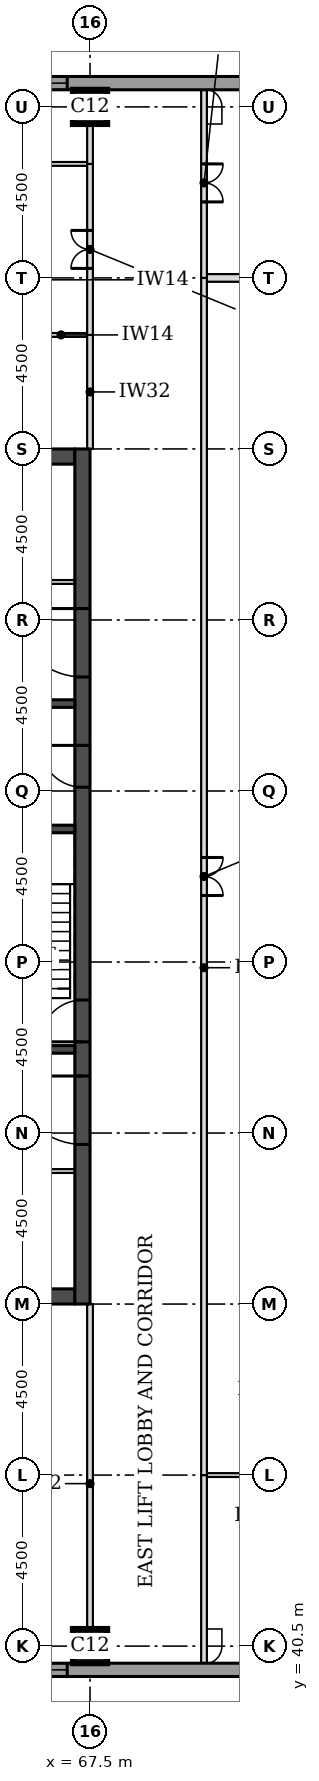
"""IFC4 building model, lengths in metres.
Left out: names, types, materials, properties, quantities, classifications, styles, units other than length and angle.
Written with IfcOpenShell. Run it as: python <this file> out.ifc"""

import sys

from ifc_helpers import new_model, si_unit, direction, frame, frame_2d, origin, origin_2d, place, context, subcontext, project, spatial, rectangle, extrude, element, fill, save


model = new_model("IFC4")
c1 = context("Model", 3, precision=1e-05, world=origin(), true_north=direction((0.0, 1.0)))
c2 = subcontext(c1, "Body", "Model", "MODEL_VIEW")
j1 = project(units=[si_unit("LENGTHUNIT", "METRE"), si_unit("PLANEANGLEUNIT", "RADIAN")], contexts=[c1])
p1 = place(None, origin())
s1 = spatial("IfcSite", under=j1, at=p1, CompositionType="ELEMENT")
p2 = place(p1, origin())
s2 = spatial("IfcBuilding", under=s1, at=p2, CompositionType="ELEMENT")
p3 = place(p2, frame((0.0, 0.0, 173.6)))
s3 = spatial("IfcBuildingStorey", under=s2, at=p3, CompositionType="ELEMENT", Elevation=173.6)
for number, where, z_axis, x_axis in (
    (1, (67.5, 40.5, 0.0), (0.0, 0.0, 1.0), (1.0, 0.0, 0.0)),
    (2, (67.5, 81.0, 0.0), (0.0, 0.0, 1.0), (1.0, 0.0, 0.0)),
):
    element("IfcColumn", number, at=place(p3, frame(where, z_axis=z_axis, x_axis=x_axis)), inside=s3, PredefinedType="COLUMN", context=c2, shape_type="SweptSolid", body=[
        extrude(rectangle(XDim=0.9, YDim=0.9, at=origin_2d()), origin(), (0.0, 0.0, 1.0), 3.7),
    ])
for number, where, z_axis, x_axis in (
    (3, (45.4, 49.7, 0.0), (0.0, 0.0, 1.0), (1.0, 0.0, 0.0)),
    (4, (45.4, 71.8, 0.0), (0.0, 0.0, 1.0), (1.0, 0.0, 0.0)),
):
    element("IfcWall", number, at=place(p3, frame(where, z_axis=z_axis, x_axis=x_axis)), inside=s3, PredefinedType="SHEAR", context=c2, shape_type="SweptSolid", body=[
        extrude(rectangle(XDim=21.7, YDim=0.4, at=frame_2d((10.85, 0.0))), origin(), (0.0, 0.0, 1.0), 3.7),
    ])
p4 = place(p3, frame((67.3, 49.5, 0.0), z_axis=(0.0, 0.0, 1.0), x_axis=(0.0, 1.0, 0.0)))
e5 = element("IfcWall", 5, at=p4, inside=s3, PredefinedType="SHEAR", context=c2, shape_type="SweptSolid", body=[
    extrude(rectangle(XDim=22.5, YDim=0.4, at=frame_2d((11.25, 0.0))), origin(), (0.0, 0.0, 1.0), 3.7),
])
p5 = place(p4, frame((4.2, 0.0, 0.0)))
e6 = element("IfcOpeningElement", 6, at=p5, cuts=e5, PredefinedType="OPENING", context=c2, shape_type="SweptSolid", body=[
    extrude(rectangle(XDim=1.8, YDim=2.1, at=frame_2d((0.9, 1.05))), frame((0.0, 0.21, 0.0), z_axis=(0.0, -1.0, 0.0), x_axis=(1.0, 0.0, 0.0)), (0.0, 0.0, 1.0), 0.42),
])
p6 = place(p4, frame((6.9, 0.0, 0.0)))
e7 = element("IfcOpeningElement", 7, at=p6, cuts=e5, PredefinedType="OPENING", context=c2, shape_type="SweptSolid", body=[
    extrude(rectangle(XDim=1.1, YDim=2.1, at=frame_2d((0.55, 1.05))), frame((0.0, 0.21, 0.0), z_axis=(0.0, -1.0, 0.0), x_axis=(1.0, 0.0, 0.0)), (0.0, 0.0, 1.0), 0.42),
])
p7 = place(p4, frame((13.6, 0.0, 0.0)))
e8 = element("IfcOpeningElement", 8, at=p7, cuts=e5, PredefinedType="OPENING", context=c2, shape_type="SweptSolid", body=[
    extrude(rectangle(XDim=1.1, YDim=2.1, at=frame_2d((0.55, 1.05))), frame((0.0, 0.21, 0.0), z_axis=(0.0, -1.0, 0.0), x_axis=(1.0, 0.0, 0.0)), (0.0, 0.0, 1.0), 0.42),
])
p8 = place(p4, frame((16.5, 0.0, 0.0)))
e9 = element("IfcOpeningElement", 9, at=p8, cuts=e5, PredefinedType="OPENING", context=c2, shape_type="SweptSolid", body=[
    extrude(rectangle(XDim=1.8, YDim=2.1, at=frame_2d((0.9, 1.05))), frame((0.0, 0.21, 0.0), z_axis=(0.0, -1.0, 0.0), x_axis=(1.0, 0.0, 0.0)), (0.0, 0.0, 1.0), 0.42),
])
p9 = place(p3, frame((36.0, 39.875, 0.0), z_axis=(0.0, 0.0, 1.0), x_axis=(1.0, 0.0, 0.0)))
e10 = element("IfcWall", 10, at=p9, inside=s3, PredefinedType="STANDARD", context=c2, shape_type="SweptSolid", body=[
    extrude(rectangle(XDim=36.331, YDim=0.35, at=frame_2d((18.166, 0.0))), origin(), (0.0, 0.0, 1.0), 3.525),
])
p10 = place(p9, frame((5.1, 0.0, 0.9)))
e11 = element("IfcOpeningElement", 11, at=p10, cuts=e10, PredefinedType="OPENING", context=c2, shape_type="SweptSolid", body=[
    extrude(rectangle(XDim=3.3, YDim=1.9, at=frame_2d((1.65, 0.95))), frame((0.0, 0.185, 0.0), z_axis=(0.0, -1.0, 0.0), x_axis=(1.0, 0.0, 0.0)), (0.0, 0.0, 1.0), 0.37),
])
p11 = place(p9, frame((9.6, 0.0, 0.9)))
e12 = element("IfcOpeningElement", 12, at=p11, cuts=e10, PredefinedType="OPENING", context=c2, shape_type="SweptSolid", body=[
    extrude(rectangle(XDim=3.3, YDim=1.9, at=frame_2d((1.65, 0.95))), frame((0.0, 0.185, 0.0), z_axis=(0.0, -1.0, 0.0), x_axis=(1.0, 0.0, 0.0)), (0.0, 0.0, 1.0), 0.37),
])
p12 = place(p9, frame((14.1, 0.0, 0.9)))
e13 = element("IfcOpeningElement", 13, at=p12, cuts=e10, PredefinedType="OPENING", context=c2, shape_type="SweptSolid", body=[
    extrude(rectangle(XDim=3.3, YDim=1.9, at=frame_2d((1.65, 0.95))), frame((0.0, 0.185, 0.0), z_axis=(0.0, -1.0, 0.0), x_axis=(1.0, 0.0, 0.0)), (0.0, 0.0, 1.0), 0.37),
])
p13 = place(p9, frame((18.6, 0.0, 0.9)))
e14 = element("IfcOpeningElement", 14, at=p13, cuts=e10, PredefinedType="OPENING", context=c2, shape_type="SweptSolid", body=[
    extrude(rectangle(XDim=3.3, YDim=1.9, at=frame_2d((1.65, 0.95))), frame((0.0, 0.185, 0.0), z_axis=(0.0, -1.0, 0.0), x_axis=(1.0, 0.0, 0.0)), (0.0, 0.0, 1.0), 0.37),
])
p14 = place(p9, frame((23.1, 0.0, 0.9)))
e15 = element("IfcOpeningElement", 15, at=p14, cuts=e10, PredefinedType="OPENING", context=c2, shape_type="SweptSolid", body=[
    extrude(rectangle(XDim=3.3, YDim=1.9, at=frame_2d((1.65, 0.95))), frame((0.0, 0.185, 0.0), z_axis=(0.0, -1.0, 0.0), x_axis=(1.0, 0.0, 0.0)), (0.0, 0.0, 1.0), 0.37),
])
p15 = place(p9, frame((27.6, 0.0, 0.9)))
e16 = element("IfcOpeningElement", 16, at=p15, cuts=e10, PredefinedType="OPENING", context=c2, shape_type="SweptSolid", body=[
    extrude(rectangle(XDim=3.3, YDim=1.9, at=frame_2d((1.65, 0.95))), frame((0.0, 0.185, 0.0), z_axis=(0.0, -1.0, 0.0), x_axis=(1.0, 0.0, 0.0)), (0.0, 0.0, 1.0), 0.37),
])
p16 = place(p3, frame((72.331, 81.625, 0.0), z_axis=(0.0, 0.0, 1.0), x_axis=(-1.0, 0.0, 0.0)))
e17 = element("IfcWall", 17, at=p16, inside=s3, PredefinedType="STANDARD", context=c2, shape_type="SweptSolid", body=[
    extrude(rectangle(XDim=32.163, YDim=0.35, at=frame_2d((16.081, 0.0))), origin(), (0.0, 0.0, 1.0), 3.525),
])
p17 = place(p16, frame((5.431, 0.0, 0.9)))
e18 = element("IfcOpeningElement", 18, at=p17, cuts=e17, PredefinedType="OPENING", context=c2, shape_type="SweptSolid", body=[
    extrude(rectangle(XDim=3.3, YDim=1.9, at=frame_2d((1.65, 0.95))), frame((0.0, 0.185, 0.0), z_axis=(0.0, -1.0, 0.0), x_axis=(1.0, 0.0, 0.0)), (0.0, 0.0, 1.0), 0.37),
])
p18 = place(p16, frame((9.931, 0.0, 0.9)))
e19 = element("IfcOpeningElement", 19, at=p18, cuts=e17, PredefinedType="OPENING", context=c2, shape_type="SweptSolid", body=[
    extrude(rectangle(XDim=3.3, YDim=1.9, at=frame_2d((1.65, 0.95))), frame((0.0, 0.185, 0.0), z_axis=(0.0, -1.0, 0.0), x_axis=(1.0, 0.0, 0.0)), (0.0, 0.0, 1.0), 0.37),
])
p19 = place(p16, frame((14.431, 0.0, 0.9)))
e20 = element("IfcOpeningElement", 20, at=p19, cuts=e17, PredefinedType="OPENING", context=c2, shape_type="SweptSolid", body=[
    extrude(rectangle(XDim=3.3, YDim=1.9, at=frame_2d((1.65, 0.95))), frame((0.0, 0.185, 0.0), z_axis=(0.0, -1.0, 0.0), x_axis=(1.0, 0.0, 0.0)), (0.0, 0.0, 1.0), 0.37),
])
p20 = place(p16, frame((18.931, 0.0, 0.9)))
e21 = element("IfcOpeningElement", 21, at=p20, cuts=e17, PredefinedType="OPENING", context=c2, shape_type="SweptSolid", body=[
    extrude(rectangle(XDim=3.3, YDim=1.9, at=frame_2d((1.65, 0.95))), frame((0.0, 0.185, 0.0), z_axis=(0.0, -1.0, 0.0), x_axis=(1.0, 0.0, 0.0)), (0.0, 0.0, 1.0), 0.37),
])
p21 = place(p16, frame((23.431, 0.0, 0.9)))
e22 = element("IfcOpeningElement", 22, at=p21, cuts=e17, PredefinedType="OPENING", context=c2, shape_type="SweptSolid", body=[
    extrude(rectangle(XDim=3.3, YDim=1.9, at=frame_2d((1.65, 0.95))), frame((0.0, 0.185, 0.0), z_axis=(0.0, -1.0, 0.0), x_axis=(1.0, 0.0, 0.0)), (0.0, 0.0, 1.0), 0.37),
])
p22 = place(p3, frame((70.575, 45.0, 0.0), z_axis=(0.0, 0.0, 1.0), x_axis=(1.0, 0.0, 0.0)))
e23 = element("IfcWall", 23, at=p22, inside=s3, PredefinedType="PARTITIONING", context=c2, shape_type="SweptSolid", body=[
    extrude(rectangle(XDim=2.925, YDim=0.1, at=frame_2d((1.462, 0.0))), origin(), (0.0, 0.0, 1.0), 3.096),
])
p23 = place(p22, frame((1.0, 0.0, 0.0)))
e24 = element("IfcOpeningElement", 24, at=p23, cuts=e23, PredefinedType="OPENING", context=c2, shape_type="SweptSolid", body=[
    extrude(rectangle(XDim=0.9, YDim=2.1, at=frame_2d((0.45, 1.05))), frame((0.0, 0.06, 0.0), z_axis=(0.0, -1.0, 0.0), x_axis=(1.0, 0.0, 0.0)), (0.0, 0.0, 1.0), 0.12),
])
p24 = place(p3, frame((64.45, 75.0, 0.0), z_axis=(0.0, 0.0, 1.0), x_axis=(1.0, 0.0, 0.0)))
e25 = element("IfcWall", 25, at=p24, inside=s3, PredefinedType="PARTITIONING", context=c2, shape_type="SweptSolid", body=[
    extrude(rectangle(XDim=2.975, YDim=0.1, at=frame_2d((1.488, 0.0))), origin(), (0.0, 0.0, 1.0), 3.55),
])
p25 = place(p3, frame((70.575, 76.5, 0.0), z_axis=(0.0, 0.0, 1.0), x_axis=(1.0, 0.0, 0.0)))
e26 = element("IfcWall", 26, at=p25, inside=s3, PredefinedType="PARTITIONING", context=c2, shape_type="SweptSolid", body=[
    extrude(rectangle(XDim=5.475, YDim=0.2, at=frame_2d((2.738, 0.0))), origin(), (0.0, 0.0, 1.0), 3.096),
])
p26 = place(p3, frame((64.45, 79.5, 0.0), z_axis=(0.0, 0.0, 1.0), x_axis=(1.0, 0.0, 0.0)))
e27 = element("IfcWall", 27, at=p26, inside=s3, PredefinedType="PARTITIONING", context=c2, shape_type="SweptSolid", body=[
    extrude(rectangle(XDim=2.975, YDim=0.1, at=frame_2d((1.488, 0.0))), origin(), (0.0, 0.0, 1.0), 3.55),
])
p27 = place(p3, frame((67.5, 40.05, 0.0), z_axis=(0.0, 0.0, 1.0), x_axis=(0.0, 1.0, 0.0)))
e28 = element("IfcWall", 28, at=p27, inside=s3, PredefinedType="PARTITIONING", context=c2, shape_type="SweptSolid", body=[
    extrude(rectangle(XDim=9.45, YDim=0.15, at=frame_2d((4.725, 0.0))), origin(), (0.0, 0.0, 1.0), 3.022),
])
p28 = place(p3, frame((70.5, 40.05, 0.0), z_axis=(0.0, 0.0, 1.0), x_axis=(0.0, 1.0, 0.0)))
e29 = element("IfcWall", 29, at=p28, inside=s3, PredefinedType="PARTITIONING", context=c2, shape_type="SweptSolid", body=[
    extrude(rectangle(XDim=4.95, YDim=0.15, at=frame_2d((2.475, 0.0))), origin(), (0.0, 0.0, 1.0), 3.55),
])
p29 = place(p3, frame((70.5, 45.0, 0.0), z_axis=(0.0, 0.0, 1.0), x_axis=(0.0, 1.0, 0.0)))
e30 = element("IfcWall", 30, at=p29, inside=s3, PredefinedType="PARTITIONING", context=c2, shape_type="SweptSolid", body=[
    extrude(rectangle(XDim=31.5, YDim=0.15, at=frame_2d((15.75, 0.0))), origin(), (0.0, 0.0, 1.0), 3.55),
])
p30 = place(p29, frame((15.25, 0.0, 0.0)))
e31 = element("IfcOpeningElement", 31, at=p30, cuts=e30, PredefinedType="OPENING", context=c2, shape_type="SweptSolid", body=[
    extrude(rectangle(XDim=1.0, YDim=2.1, at=frame_2d((0.5, 1.05))), frame((0.0, 0.085, 0.0), z_axis=(0.0, -1.0, 0.0), x_axis=(1.0, 0.0, 0.0)), (0.0, 0.0, 1.0), 0.17),
])
p31 = place(p3, frame((67.5, 72.0, 0.0), z_axis=(0.0, 0.0, 1.0), x_axis=(0.0, 1.0, 0.0)))
e32 = element("IfcWall", 32, at=p31, inside=s3, PredefinedType="PARTITIONING", context=c2, shape_type="SweptSolid", body=[
    extrude(rectangle(XDim=3.0, YDim=0.15, at=frame_2d((1.5, 0.0))), origin(), (0.0, 0.0, 1.0), 3.022),
])
p32 = place(p3, frame((67.5, 75.0, 0.0), z_axis=(0.0, 0.0, 1.0), x_axis=(0.0, 1.0, 0.0)))
e33 = element("IfcWall", 33, at=p32, inside=s3, PredefinedType="PARTITIONING", context=c2, shape_type="SweptSolid", body=[
    extrude(rectangle(XDim=4.5, YDim=0.15, at=frame_2d((2.25, 0.0))), origin(), (0.0, 0.0, 1.0), 3.022),
])
p33 = place(p32, frame((1.75, 0.0, 0.0)))
e34 = element("IfcOpeningElement", 34, at=p33, cuts=e33, PredefinedType="OPENING", context=c2, shape_type="SweptSolid", body=[
    extrude(rectangle(XDim=1.0, YDim=2.1, at=frame_2d((0.5, 1.05))), frame((0.0, 0.085, 0.0), z_axis=(0.0, -1.0, 0.0), x_axis=(1.0, 0.0, 0.0)), (0.0, 0.0, 1.0), 0.17),
])
p34 = place(p3, frame((70.5, 76.5, 0.0), z_axis=(0.0, 0.0, 1.0), x_axis=(0.0, 1.0, 0.0)))
e35 = element("IfcWall", 35, at=p34, inside=s3, PredefinedType="PARTITIONING", context=c2, shape_type="SweptSolid", body=[
    extrude(rectangle(XDim=4.95, YDim=0.15, at=frame_2d((2.475, 0.0))), origin(), (0.0, 0.0, 1.0), 3.55),
])
p35 = place(p34, frame((2.0, 0.0, 0.0)))
e36 = element("IfcOpeningElement", 36, at=p35, cuts=e35, PredefinedType="OPENING", context=c2, shape_type="SweptSolid", body=[
    extrude(rectangle(XDim=1.0, YDim=2.1, at=frame_2d((0.5, 1.05))), frame((0.0, 0.085, 0.0), z_axis=(0.0, -1.0, 0.0), x_axis=(1.0, 0.0, 0.0)), (0.0, 0.0, 1.0), 0.17),
])
p36 = place(p3, frame((67.5, 79.5, 0.0), z_axis=(0.0, 0.0, 1.0), x_axis=(0.0, 1.0, 0.0)))
e37 = element("IfcWall", 37, at=p36, inside=s3, PredefinedType="PARTITIONING", context=c2, shape_type="SweptSolid", body=[
    extrude(rectangle(XDim=1.95, YDim=0.15, at=frame_2d((0.975, 0.0))), origin(), (0.0, 0.0, 1.0), 3.022),
])
p37 = place(p3, frame((45.4, 53.0, 0.0), z_axis=(0.0, 0.0, 1.0), x_axis=(1.0, 0.0, 0.0)))
e38 = element("IfcWall", 38, at=p37, inside=s3, PredefinedType="PARTITIONING", context=c2, shape_type="SweptSolid", body=[
    extrude(rectangle(XDim=21.7, YDim=0.1, at=frame_2d((10.85, 0.0))), origin(), (0.0, 0.0, 1.0), 3.55),
])
p38 = place(p37, frame((18.625, 0.0, 0.0)))
e39 = element("IfcOpeningElement", 39, at=p38, cuts=e38, PredefinedType="OPENING", context=c2, shape_type="SweptSolid", body=[
    extrude(rectangle(XDim=0.9, YDim=2.1, at=frame_2d((0.45, 1.05))), frame((0.0, 0.06, 0.0), z_axis=(0.0, -1.0, 0.0), x_axis=(1.0, 0.0, 0.0)), (0.0, 0.0, 1.0), 0.12),
])
p39 = place(p37, frame((0.393, 0.0, 0.0)))
e40 = element("IfcOpeningElement", 40, at=p39, cuts=e38, PredefinedType="OPENING", context=c2, shape_type="SweptSolid", body=[
    extrude(rectangle(XDim=1.0, YDim=2.1, at=frame_2d((0.5, 1.05))), frame((0.0, 0.06, 0.0), z_axis=(0.0, -1.0, 0.0), x_axis=(1.0, 0.0, 0.0)), (0.0, 0.0, 1.0), 0.12),
])
p40 = place(p37, frame((2.201, 0.0, 0.0)))
e41 = element("IfcOpeningElement", 41, at=p40, cuts=e38, PredefinedType="OPENING", context=c2, shape_type="SweptSolid", body=[
    extrude(rectangle(XDim=0.9, YDim=2.1, at=frame_2d((0.45, 1.05))), frame((0.0, 0.06, 0.0), z_axis=(0.0, -1.0, 0.0), x_axis=(1.0, 0.0, 0.0)), (0.0, 0.0, 1.0), 0.12),
])
p41 = place(p37, frame((3.934, 0.0, 0.0)))
e42 = element("IfcOpeningElement", 42, at=p41, cuts=e38, PredefinedType="OPENING", context=c2, shape_type="SweptSolid", body=[
    extrude(rectangle(XDim=0.9, YDim=2.1, at=frame_2d((0.45, 1.05))), frame((0.0, 0.06, 0.0), z_axis=(0.0, -1.0, 0.0), x_axis=(1.0, 0.0, 0.0)), (0.0, 0.0, 1.0), 0.12),
])
p42 = place(p37, frame((7.88, 0.0, 0.0)))
e43 = element("IfcOpeningElement", 43, at=p42, cuts=e38, PredefinedType="OPENING", context=c2, shape_type="SweptSolid", body=[
    extrude(rectangle(XDim=0.9, YDim=2.1, at=frame_2d((0.45, 1.05))), frame((0.0, 0.06, 0.0), z_axis=(0.0, -1.0, 0.0), x_axis=(1.0, 0.0, 0.0)), (0.0, 0.0, 1.0), 0.12),
])
p43 = place(p37, frame((13.48, 0.0, 0.0)))
e44 = element("IfcOpeningElement", 44, at=p43, cuts=e38, PredefinedType="OPENING", context=c2, shape_type="SweptSolid", body=[
    extrude(rectangle(XDim=0.9, YDim=2.1, at=frame_2d((0.45, 1.05))), frame((0.0, 0.06, 0.0), z_axis=(0.0, -1.0, 0.0), x_axis=(1.0, 0.0, 0.0)), (0.0, 0.0, 1.0), 0.12),
])
p44 = place(p3, frame((63.9, 56.2, 0.0), z_axis=(0.0, 0.0, 1.0), x_axis=(1.0, 0.0, 0.0)))
e45 = element("IfcWall", 45, at=p44, inside=s3, PredefinedType="SOLIDWALL", context=c2, shape_type="SweptSolid", body=[
    extrude(rectangle(XDim=3.2, YDim=0.2, at=frame_2d((1.6, 0.0))), origin(), (0.0, 0.0, 1.0), 3.55),
])
p45 = place(p3, frame((61.85, 62.0, 0.0), z_axis=(0.0, 0.0, 1.0), x_axis=(1.0, 0.0, 0.0)))
e46 = element("IfcWall", 46, at=p45, inside=s3, PredefinedType="SOLIDWALL", context=c2, shape_type="SweptSolid", body=[
    extrude(rectangle(XDim=5.25, YDim=0.2, at=frame_2d((2.625, 0.0))), origin(), (0.0, 0.0, 1.0), 3.55),
])
p46 = place(p3, frame((64.7, 65.3, 0.0), z_axis=(0.0, 0.0, 1.0), x_axis=(1.0, 0.0, 0.0)))
e47 = element("IfcWall", 47, at=p46, inside=s3, PredefinedType="SOLIDWALL", context=c2, shape_type="SweptSolid", body=[
    extrude(rectangle(XDim=2.4, YDim=0.2, at=frame_2d((1.2, 0.0))), origin(), (0.0, 0.0, 1.0), 3.55),
])
p47 = place(p3, frame((45.4, 68.5, 0.0), z_axis=(0.0, 0.0, 1.0), x_axis=(1.0, 0.0, 0.0)))
e48 = element("IfcWall", 48, at=p47, inside=s3, PredefinedType="PARTITIONING", context=c2, shape_type="SweptSolid", body=[
    extrude(rectangle(XDim=21.7, YDim=0.1, at=frame_2d((10.85, 0.0))), origin(), (0.0, 0.0, 1.0), 3.55),
])
p48 = place(p47, frame((19.544, 0.0, 0.0)))
e49 = element("IfcOpeningElement", 49, at=p48, cuts=e48, PredefinedType="OPENING", context=c2, shape_type="SweptSolid", body=[
    extrude(rectangle(XDim=0.9, YDim=2.1, at=frame_2d((0.45, 1.05))), frame((0.0, 0.06, 0.0), z_axis=(0.0, -1.0, 0.0), x_axis=(1.0, 0.0, 0.0)), (0.0, 0.0, 1.0), 0.12),
])
p49 = place(p47, frame((16.919, 0.0, 0.0)))
e50 = element("IfcOpeningElement", 50, at=p49, cuts=e48, PredefinedType="OPENING", context=c2, shape_type="SweptSolid", body=[
    extrude(rectangle(XDim=0.9, YDim=2.1, at=frame_2d((0.45, 1.05))), frame((0.0, 0.06, 0.0), z_axis=(0.0, -1.0, 0.0), x_axis=(1.0, 0.0, 0.0)), (0.0, 0.0, 1.0), 0.12),
])
p50 = place(p47, frame((0.6, 0.0, 0.0)))
e51 = element("IfcOpeningElement", 51, at=p50, cuts=e48, PredefinedType="OPENING", context=c2, shape_type="SweptSolid", body=[
    extrude(rectangle(XDim=0.9, YDim=2.1, at=frame_2d((0.45, 1.05))), frame((0.0, 0.06, 0.0), z_axis=(0.0, -1.0, 0.0), x_axis=(1.0, 0.0, 0.0)), (0.0, 0.0, 1.0), 0.12),
])
p51 = place(p47, frame((3.225, 0.0, 0.0)))
e52 = element("IfcOpeningElement", 52, at=p51, cuts=e48, PredefinedType="OPENING", context=c2, shape_type="SweptSolid", body=[
    extrude(rectangle(XDim=0.9, YDim=2.1, at=frame_2d((0.45, 1.05))), frame((0.0, 0.06, 0.0), z_axis=(0.0, -1.0, 0.0), x_axis=(1.0, 0.0, 0.0)), (0.0, 0.0, 1.0), 0.12),
])
p52 = place(p47, frame((12.92, 0.0, 0.0)))
e53 = element("IfcOpeningElement", 53, at=p52, cuts=e48, PredefinedType="OPENING", context=c2, shape_type="SweptSolid", body=[
    extrude(rectangle(XDim=0.9, YDim=2.1, at=frame_2d((0.45, 1.05))), frame((0.0, 0.06, 0.0), z_axis=(0.0, -1.0, 0.0), x_axis=(1.0, 0.0, 0.0)), (0.0, 0.0, 1.0), 0.12),
])
p53 = place(p47, frame((7.32, 0.0, 0.0)))
e54 = element("IfcOpeningElement", 54, at=p53, cuts=e48, PredefinedType="OPENING", context=c2, shape_type="SweptSolid", body=[
    extrude(rectangle(XDim=0.9, YDim=2.1, at=frame_2d((0.45, 1.05))), frame((0.0, 0.06, 0.0), z_axis=(0.0, -1.0, 0.0), x_axis=(1.0, 0.0, 0.0)), (0.0, 0.0, 1.0), 0.12),
])
p54 = place(p15, origin())
e55 = element("IfcWindow", 55, at=p54, inside=s3, PartitioningType="SINGLE_PANEL", PredefinedType="WINDOW", context=c2, shape_type="SweptSolid", body=[
    extrude(rectangle(XDim=3.3, YDim=1.9, at=frame_2d((1.65, 0.95))), frame((0.0, 0.085, 0.0), z_axis=(0.0, -1.0, 0.0), x_axis=(1.0, 0.0, 0.0)), (0.0, 0.0, 1.0), 0.06),
])
fill(e16, e55)
p55 = place(p17, origin())
e56 = element("IfcWindow", 56, at=p55, inside=s3, PartitioningType="SINGLE_PANEL", PredefinedType="WINDOW", context=c2, shape_type="SweptSolid", body=[
    extrude(rectangle(XDim=3.3, YDim=1.9, at=frame_2d((1.65, 0.95))), frame((0.0, 0.085, 0.0), z_axis=(0.0, -1.0, 0.0), x_axis=(1.0, 0.0, 0.0)), (0.0, 0.0, 1.0), 0.06),
])
fill(e18, e56)
p56 = place(p33, origin())
e57 = element("IfcDoor", 57, at=p56, inside=s3, OperationType="DOUBLE_DOOR_SINGLE_SWING", PredefinedType="DOOR", context=c2, shape_type="SweptSolid", body=[
    extrude(rectangle(XDim=1.0, YDim=2.1, at=frame_2d((0.5, 1.05))), frame((0.0, 0.025, 0.0), z_axis=(0.0, -1.0, 0.0), x_axis=(1.0, 0.0, 0.0)), (0.0, 0.0, 1.0), 0.05),
])
fill(e34, e57)
p57 = place(p30, frame((1.0, 0.0, 0.0), z_axis=(0.0, 0.0, 1.0), x_axis=(-1.0, 0.0, 0.0)))
e58 = element("IfcDoor", 58, at=p57, inside=s3, OperationType="DOUBLE_DOOR_SINGLE_SWING", PredefinedType="DOOR", context=c2, shape_type="SweptSolid", body=[
    extrude(rectangle(XDim=1.0, YDim=2.1, at=frame_2d((0.5, 1.05))), frame((0.0, 0.025, 0.0), z_axis=(0.0, -1.0, 0.0), x_axis=(1.0, 0.0, 0.0)), (0.0, 0.0, 1.0), 0.05),
])
fill(e31, e58)
p58 = place(p35, frame((1.0, 0.0, 0.0), z_axis=(0.0, 0.0, 1.0), x_axis=(-1.0, 0.0, 0.0)))
e59 = element("IfcDoor", 59, at=p58, inside=s3, OperationType="DOUBLE_DOOR_SINGLE_SWING", PredefinedType="DOOR", context=c2, shape_type="SweptSolid", body=[
    extrude(rectangle(XDim=1.0, YDim=2.1, at=frame_2d((0.5, 1.05))), frame((0.0, 0.025, 0.0), z_axis=(0.0, -1.0, 0.0), x_axis=(1.0, 0.0, 0.0)), (0.0, 0.0, 1.0), 0.05),
])
fill(e36, e59)
p59 = place(p5, origin())
e60 = element("IfcDoor", 60, at=p59, inside=s3, OperationType="SINGLE_SWING_RIGHT", PredefinedType="DOOR", context=c2, shape_type="SweptSolid", body=[
    extrude(rectangle(XDim=1.8, YDim=2.1, at=frame_2d((0.9, 1.05))), frame((0.0, 0.025, 0.0), z_axis=(0.0, -1.0, 0.0), x_axis=(1.0, 0.0, 0.0)), (0.0, 0.0, 1.0), 0.05),
])
fill(e6, e60)
p60 = place(p6, origin())
e61 = element("IfcDoor", 61, at=p60, inside=s3, OperationType="SINGLE_SWING_LEFT", PredefinedType="DOOR", context=c2, shape_type="SweptSolid", body=[
    extrude(rectangle(XDim=1.1, YDim=2.1, at=frame_2d((0.55, 1.05))), frame((0.0, 0.025, 0.0), z_axis=(0.0, -1.0, 0.0), x_axis=(1.0, 0.0, 0.0)), (0.0, 0.0, 1.0), 0.05),
])
fill(e7, e61)
p61 = place(p7, origin())
e62 = element("IfcDoor", 62, at=p61, inside=s3, OperationType="SINGLE_SWING_RIGHT", PredefinedType="DOOR", context=c2, shape_type="SweptSolid", body=[
    extrude(rectangle(XDim=1.1, YDim=2.1, at=frame_2d((0.55, 1.05))), frame((0.0, 0.025, 0.0), z_axis=(0.0, -1.0, 0.0), x_axis=(1.0, 0.0, 0.0)), (0.0, 0.0, 1.0), 0.05),
])
fill(e8, e62)
p62 = place(p8, origin())
e63 = element("IfcDoor", 63, at=p62, inside=s3, OperationType="SINGLE_SWING_RIGHT", PredefinedType="DOOR", context=c2, shape_type="SweptSolid", body=[
    extrude(rectangle(XDim=1.8, YDim=2.1, at=frame_2d((0.9, 1.05))), frame((0.0, 0.025, 0.0), z_axis=(0.0, -1.0, 0.0), x_axis=(1.0, 0.0, 0.0)), (0.0, 0.0, 1.0), 0.05),
])
fill(e9, e63)
save(model, sys.argv[1])
